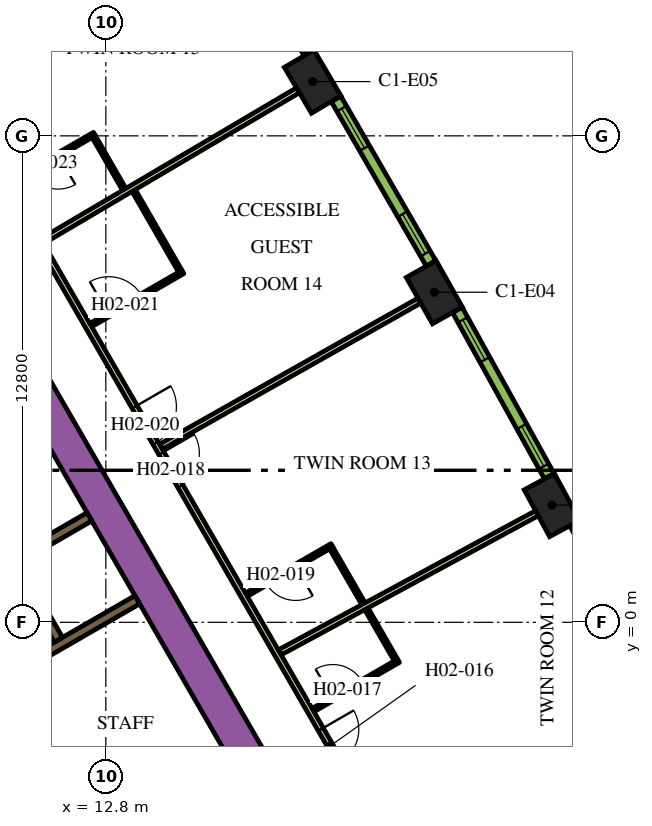
"""IFC4 building model, lengths in metres.
Left out: names, types, materials, properties, quantities, classifications, styles, units other than length and angle.
Written with IfcOpenShell. Run it as: python <this file> out.ifc"""

import sys

from ifc_helpers import new_model, si_unit, direction, frame, frame_2d, origin, origin_2d, place, context, subcontext, project, spatial, rectangle, extrude, element, fill, save


model = new_model("IFC4")
c1 = context("Model", 3, precision=1e-05, world=origin(), true_north=direction((0.0, 1.0)))
c2 = subcontext(c1, "Body", "Model", "MODEL_VIEW")
j1 = project(units=[si_unit("LENGTHUNIT", "METRE"), si_unit("PLANEANGLEUNIT", "RADIAN")], contexts=[c1])
p1 = place(None, origin())
s1 = spatial("IfcSite", under=j1, at=p1, CompositionType="ELEMENT")
p2 = place(p1, origin())
s2 = spatial("IfcBuilding", under=s1, at=p2, CompositionType="ELEMENT")
p3 = place(p2, frame((0.0, 0.0, 39.3)))
s3 = spatial("IfcBuildingStorey", under=s2, at=p3, CompositionType="ELEMENT", Elevation=39.3)
for number, where, z_axis, x_axis in (
    (1, (24.54, 3.085, 0.0), (0.0, 0.0, 1.0), (-0.476, 0.88, 0.0)),
    (2, (21.443, 8.685, 0.0), (0.0, 0.0, 1.0), (-0.492, 0.871, 0.0)),
    (3, (18.243, 14.228, 0.0), (0.0, 0.0, 1.0), (-0.508, 0.861, 0.0)),
):
    element("IfcColumn", number, at=place(p3, frame(where, z_axis=z_axis, x_axis=x_axis)), inside=s3, PredefinedType="COLUMN", context=c2, shape_type="SweptSolid", body=[
        extrude(rectangle(XDim=1.4, YDim=0.9, at=origin_2d()), origin(), (0.0, 0.0, 1.0), 3.9),
    ])
p4 = place(p3, frame((6.711, 13.476, 0.0), z_axis=(0.0, 0.0, 1.0), x_axis=(0.500002723396, -0.866023831425, 0.0)))
e4 = element("IfcWall", 4, at=p4, inside=s3, PredefinedType="SOLIDWALL", context=c2, shape_type="SweptSolid", body=[
    extrude(rectangle(XDim=20.334, YDim=0.9, at=frame_2d((10.167, 0.0))), origin(), (0.0, 0.0, 1.0), 3.9),
])
p5 = place(p3, frame((8.334, -2.964, 0.0), z_axis=(0.0, 0.0, 1.0), x_axis=(0.866016039709, -0.500016218704, 0.0)))
e5 = element("IfcWall", 5, at=p5, inside=s3, PredefinedType="SOLIDWALL", context=c2, shape_type="SweptSolid", body=[
    extrude(rectangle(XDim=7.05, YDim=0.25, at=frame_2d((3.525, 0.0))), origin(), (0.0, 0.0, 1.0), 3.9),
])
p6 = place(p3, frame((10.464, 1.677, 0.0), z_axis=(0.0, 0.0, 1.0), x_axis=(0.86605622881, 0.499946605688, 0.0)))
e6 = element("IfcWall", 6, at=p6, inside=s3, PredefinedType="SOLIDWALL", context=c2, shape_type="SweptSolid", body=[
    extrude(rectangle(XDim=2.2, YDim=0.25, at=frame_2d((1.1, 0.0))), origin(), (0.0, 0.0, 1.0), 3.9),
])
p7 = place(p3, frame((13.629, 0.594, 0.0), z_axis=(0.0, 0.0, 1.0), x_axis=(-0.86602790099, -0.499995674689, 0.0)))
e7 = element("IfcWall", 7, at=p7, inside=s3, PredefinedType="SOLIDWALL", context=c2, shape_type="SweptSolid", body=[
    extrude(rectangle(XDim=3.146, YDim=0.25, at=frame_2d((1.573, 0.0))), origin(), (0.0, 0.0, 1.0), 3.9),
])
p8 = place(p3, frame((11.553, -0.46, 0.0), z_axis=(0.0, 0.0, 1.0), x_axis=(-0.500006514828, 0.866021642414, 0.0)))
e8 = element("IfcWall", 8, at=p8, inside=s3, PredefinedType="SOLIDWALL", context=c2, shape_type="SweptSolid", body=[
    extrude(rectangle(XDim=12.35, YDim=0.25, at=frame_2d((6.175, 0.0))), origin(), (0.0, 0.0, 1.0), 3.9),
])
p9 = place(p8, frame((0.585, 0.0, 0.0)))
e9 = element("IfcOpeningElement", 9, at=p9, cuts=e8, PredefinedType="OPENING", context=c2, shape_type="SweptSolid", body=[
    extrude(rectangle(XDim=1.1, YDim=2.1, at=frame_2d((0.55, 1.05))), frame((0.0, 0.135, 0.0), z_axis=(0.0, -1.0, 0.0), x_axis=(1.0, 0.0, 0.0)), (0.0, 0.0, 1.0), 0.27),
])
p10 = place(p8, frame((3.105, 0.0, 0.0)))
e10 = element("IfcOpeningElement", 10, at=p10, cuts=e8, PredefinedType="OPENING", context=c2, shape_type="SweptSolid", body=[
    extrude(rectangle(XDim=1.1, YDim=2.1, at=frame_2d((0.55, 1.05))), frame((0.0, 0.135, 0.0), z_axis=(0.0, -1.0, 0.0), x_axis=(1.0, 0.0, 0.0)), (0.0, 0.0, 1.0), 0.27),
])
p11 = place(p8, frame((5.625, 0.0, 0.0)))
e11 = element("IfcOpeningElement", 11, at=p11, cuts=e8, PredefinedType="OPENING", context=c2, shape_type="SweptSolid", body=[
    extrude(rectangle(XDim=1.1, YDim=2.1, at=frame_2d((0.55, 1.05))), frame((0.0, 0.135, 0.0), z_axis=(0.0, -1.0, 0.0), x_axis=(1.0, 0.0, 0.0)), (0.0, 0.0, 1.0), 0.27),
])
p12 = place(p3, frame((6.163, 18.475, 0.0), z_axis=(0.0, 0.0, 1.0), x_axis=(0.500001317485, -0.866024643133, 0.0)))
e12 = element("IfcWall", 12, at=p12, inside=s3, PredefinedType="PARTITIONING", context=c2, shape_type="SweptSolid", body=[
    extrude(rectangle(XDim=25.767, YDim=0.15, at=frame_2d((12.883, 0.0))), origin(), (0.0, 0.0, 1.0), 2.75),
])
p13 = place(p12, frame((24.586, 0.0, 0.0)))
e13 = element("IfcOpeningElement", 13, at=p13, cuts=e12, PredefinedType="OPENING", context=c2, shape_type="SweptSolid", body=[
    extrude(rectangle(XDim=1.0, YDim=2.1, at=frame_2d((0.5, 1.05))), frame((0.0, 0.085, 0.0), z_axis=(0.0, -1.0, 0.0), x_axis=(1.0, 0.0, 0.0)), (0.0, 0.0, 1.0), 0.17),
])
p14 = place(p12, frame((16.196, 0.0, 0.0)))
e14 = element("IfcOpeningElement", 14, at=p14, cuts=e12, PredefinedType="OPENING", context=c2, shape_type="SweptSolid", body=[
    extrude(rectangle(XDim=1.0, YDim=2.1, at=frame_2d((0.5, 1.05))), frame((0.0, 0.085, 0.0), z_axis=(0.0, -1.0, 0.0), x_axis=(1.0, 0.0, 0.0)), (0.0, 0.0, 1.0), 0.17),
])
p15 = place(p12, frame((14.789, 0.0, 0.0)))
e15 = element("IfcOpeningElement", 15, at=p15, cuts=e12, PredefinedType="OPENING", context=c2, shape_type="SweptSolid", body=[
    extrude(rectangle(XDim=1.1, YDim=2.1, at=frame_2d((0.55, 1.05))), frame((0.0, 0.085, 0.0), z_axis=(0.0, -1.0, 0.0), x_axis=(1.0, 0.0, 0.0)), (0.0, 0.0, 1.0), 0.17),
])
p16 = place(p12, frame((3.698, 0.0, 0.0)))
e16 = element("IfcOpeningElement", 16, at=p16, cuts=e12, PredefinedType="OPENING", context=c2, shape_type="SweptSolid", body=[
    extrude(rectangle(XDim=1.0, YDim=2.1, at=frame_2d((0.5, 1.05))), frame((0.0, 0.085, 0.0), z_axis=(0.0, -1.0, 0.0), x_axis=(1.0, 0.0, 0.0)), (0.0, 0.0, 1.0), 0.17),
])
p17 = place(p12, frame((2.391, 0.0, 0.0)))
e17 = element("IfcOpeningElement", 17, at=p17, cuts=e12, PredefinedType="OPENING", context=c2, shape_type="SweptSolid", body=[
    extrude(rectangle(XDim=1.0, YDim=2.1, at=frame_2d((0.5, 1.05))), frame((0.0, 0.085, 0.0), z_axis=(0.0, -1.0, 0.0), x_axis=(1.0, 0.0, 0.0)), (0.0, 0.0, 1.0), 0.17),
])
p18 = place(p3, frame((17.856, 13.999, 0.0), z_axis=(0.0, 0.0, 1.0), x_axis=(-0.861371519381, -0.507975497047, 0.0)))
e18 = element("IfcWall", 18, at=p18, inside=s3, PredefinedType="PARTITIONING", context=c2, shape_type="SweptSolid", body=[
    extrude(rectangle(XDim=7.804, YDim=0.15, at=frame_2d((3.902, 0.0))), origin(), (0.0, 0.0, 1.0), 2.75),
])
p19 = place(p3, frame((21.052, 8.464, 0.0), z_axis=(0.0, 0.0, 1.0), x_axis=(-0.87059371954, -0.492002617368, 0.0)))
e19 = element("IfcWall", 19, at=p19, inside=s3, PredefinedType="PARTITIONING", context=c2, shape_type="SweptSolid", body=[
    extrude(rectangle(XDim=7.803, YDim=0.15, at=frame_2d((3.902, 0.0))), origin(), (0.0, 0.0, 1.0), 2.75),
])
p20 = place(p3, frame((27.134, -2.779, 0.0), z_axis=(0.0, 0.0, 1.0), x_axis=(-0.8882049501, -0.459447457951, 0.0)))
e20 = element("IfcWall", 20, at=p20, inside=s3, PredefinedType="PARTITIONING", context=c2, shape_type="SweptSolid", body=[
    extrude(rectangle(XDim=11.638, YDim=0.15, at=frame_2d((5.819, 0.0))), origin(), (0.0, 0.0, 1.0), 2.75),
])
p21 = place(p3, frame((24.145, 2.871, 0.0), z_axis=(0.0, 0.0, 1.0), x_axis=(-0.879551725039, -0.475803281809, 0.0)))
e21 = element("IfcWall", 21, at=p21, inside=s3, PredefinedType="PARTITIONING", context=c2, shape_type="SweptSolid", body=[
    extrude(rectangle(XDim=7.688, YDim=0.15, at=frame_2d((3.844, 0.0))), origin(), (0.0, 0.0, 1.0), 2.75),
])
p22 = place(p3, frame((18.25, -2.311, 0.0), z_axis=(0.0, 0.0, 1.0), x_axis=(0.866021400173, 0.500006934395, 0.0)))
e22 = element("IfcWall", 22, at=p22, inside=s3, PredefinedType="PARTITIONING", context=c2, shape_type="SweptSolid", body=[
    extrude(rectangle(XDim=2.6, YDim=0.1, at=frame_2d((1.3, 0.0))), origin(), (0.0, 0.0, 1.0), 2.75),
])
p23 = place(p22, frame((0.6, 0.0, 0.0)))
e23 = element("IfcOpeningElement", 23, at=p23, cuts=e22, PredefinedType="OPENING", context=c2, shape_type="SweptSolid", body=[
    extrude(rectangle(XDim=0.9, YDim=2.1, at=frame_2d((0.45, 1.05))), frame((0.0, 0.06, 0.0), z_axis=(0.0, -1.0, 0.0), x_axis=(1.0, 0.0, 0.0)), (0.0, 0.0, 1.0), 0.12),
])
p24 = place(p3, frame((20.434, -0.993, 0.0), z_axis=(0.0, 0.0, 1.0), x_axis=(-0.500086022567, 0.865975732936, 0.0)))
e24 = element("IfcWall", 24, at=p24, inside=s3, PredefinedType="PARTITIONING", context=c2, shape_type="SweptSolid", body=[
    extrude(rectangle(XDim=1.55, YDim=0.1, at=frame_2d((0.775, 0.0))), origin(), (0.0, 0.0, 1.0), 2.75),
])
p25 = place(p3, frame((18.749, 2.026, 0.0), z_axis=(0.0, 0.0, 1.0), x_axis=(-0.866021400173, -0.500006934395, 0.0)))
e25 = element("IfcWall", 25, at=p25, inside=s3, PredefinedType="PARTITIONING", context=c2, shape_type="SweptSolid", body=[
    extrude(rectangle(XDim=2.6, YDim=0.1, at=frame_2d((1.3, 0.0))), origin(), (0.0, 0.0, 1.0), 2.75),
])
p26 = place(p25, frame((1.1, 0.0, 0.0)))
e26 = element("IfcOpeningElement", 26, at=p26, cuts=e25, PredefinedType="OPENING", context=c2, shape_type="SweptSolid", body=[
    extrude(rectangle(XDim=0.9, YDim=2.1, at=frame_2d((0.45, 1.05))), frame((0.0, 0.06, 0.0), z_axis=(0.0, -1.0, 0.0), x_axis=(1.0, 0.0, 0.0)), (0.0, 0.0, 1.0), 0.12),
])
p27 = place(p3, frame((18.731, 1.958, 0.0), z_axis=(0.0, 0.0, 1.0), x_axis=(0.499976720371, -0.866038843867, 0.0)))
e27 = element("IfcWall", 27, at=p27, inside=s3, PredefinedType="PARTITIONING", context=c2, shape_type="SweptSolid", body=[
    extrude(rectangle(XDim=1.69, YDim=0.1, at=frame_2d((0.845, 0.0))), origin(), (0.0, 0.0, 1.0), 2.75),
])
p28 = place(p3, frame((12.402, 7.819, 0.0), z_axis=(0.0, 0.0, 1.0), x_axis=(0.866034573852, 0.49998411664, 0.0)))
e28 = element("IfcWall", 28, at=p28, inside=s3, PredefinedType="PARTITIONING", context=c2, shape_type="SweptSolid", body=[
    extrude(rectangle(XDim=2.8, YDim=0.1, at=frame_2d((1.4, 0.0))), origin(), (0.0, 0.0, 1.0), 2.75),
])
p29 = place(p28, frame((0.55, 0.0, 0.0)))
e29 = element("IfcOpeningElement", 29, at=p29, cuts=e28, PredefinedType="OPENING", context=c2, shape_type="SweptSolid", body=[
    extrude(rectangle(XDim=1.0, YDim=2.1, at=frame_2d((0.5, 1.05))), frame((0.0, 0.06, 0.0), z_axis=(0.0, -1.0, 0.0), x_axis=(1.0, 0.0, 0.0)), (0.0, 0.0, 1.0), 0.12),
])
p30 = place(p3, frame((14.759, 9.237, 0.0), z_axis=(0.0, 0.0, 1.0), x_axis=(-0.499943856944, 0.866057815567, 0.0)))
e30 = element("IfcWall", 30, at=p30, inside=s3, PredefinedType="PARTITIONING", context=c2, shape_type="SweptSolid", body=[
    extrude(rectangle(XDim=2.45, YDim=0.1, at=frame_2d((1.225, 0.0))), origin(), (0.0, 0.0, 1.0), 2.75),
])
p31 = place(p3, frame((12.5, 12.849, 0.0), z_axis=(0.0, 0.0, 1.0), x_axis=(-0.866021400173, -0.500006934395, 0.0)))
e31 = element("IfcWall", 31, at=p31, inside=s3, PredefinedType="PARTITIONING", context=c2, shape_type="SweptSolid", body=[
    extrude(rectangle(XDim=2.6, YDim=0.1, at=frame_2d((1.3, 0.0))), origin(), (0.0, 0.0, 1.0), 2.75),
])
p32 = place(p31, frame((1.1, 0.0, 0.0)))
e32 = element("IfcOpeningElement", 32, at=p32, cuts=e31, PredefinedType="OPENING", context=c2, shape_type="SweptSolid", body=[
    extrude(rectangle(XDim=0.9, YDim=2.1, at=frame_2d((0.45, 1.05))), frame((0.0, 0.06, 0.0), z_axis=(0.0, -1.0, 0.0), x_axis=(1.0, 0.0, 0.0)), (0.0, 0.0, 1.0), 0.12),
])
p33 = place(p3, frame((12.482, 12.781, 0.0), z_axis=(0.0, 0.0, 1.0), x_axis=(0.500061482766, -0.865989903783, 0.0)))
e33 = element("IfcWall", 33, at=p33, inside=s3, PredefinedType="PARTITIONING", context=c2, shape_type="SweptSolid", body=[
    extrude(rectangle(XDim=1.6, YDim=0.1, at=frame_2d((0.8, 0.0))), origin(), (0.0, 0.0, 1.0), 2.75),
])
p34 = place(p3, frame((27.475, -1.81, 0.0), z_axis=(0.0, 0.0, 1.0), x_axis=(-0.467629620899, 0.883924509026, 0.0)))
e34 = element("IfcWall", 34, at=p34, inside=s3, PredefinedType="SOLIDWALL", context=c2, shape_type="SweptSolid", body=[
    extrude(rectangle(XDim=4.998, YDim=0.29, at=frame_2d((2.499, 0.0))), origin(), (0.0, 0.0, 1.0), 3.65),
])
p35 = place(p34, frame((0.297, 0.0, 0.9)))
e35 = element("IfcOpeningElement", 35, at=p35, cuts=e34, PredefinedType="OPENING", context=c2, shape_type="SweptSolid", body=[
    extrude(rectangle(XDim=1.2, YDim=2.15, at=frame_2d((0.6, 1.075))), frame((0.0, 0.155, 0.0), z_axis=(0.0, -1.0, 0.0), x_axis=(1.0, 0.0, 0.0)), (0.0, 0.0, 1.0), 0.31),
])
p36 = place(p34, frame((3.501, 0.0, 0.9)))
e36 = element("IfcOpeningElement", 36, at=p36, cuts=e34, PredefinedType="OPENING", context=c2, shape_type="SweptSolid", body=[
    extrude(rectangle(XDim=1.2, YDim=2.15, at=frame_2d((0.6, 1.075))), frame((0.0, 0.155, 0.0), z_axis=(0.0, -1.0, 0.0), x_axis=(1.0, 0.0, 0.0)), (0.0, 0.0, 1.0), 0.31),
])
p37 = place(p3, frame((24.468, 3.846, 0.0), z_axis=(0.0, 0.0, 1.0), x_axis=(-0.483912572871, 0.875116347589, 0.0)))
e37 = element("IfcWall", 37, at=p37, inside=s3, PredefinedType="SOLIDWALL", context=c2, shape_type="SweptSolid", body=[
    extrude(rectangle(XDim=4.998, YDim=0.29, at=frame_2d((2.499, 0.0))), origin(), (0.0, 0.0, 1.0), 3.65),
])
p38 = place(p37, frame((0.297, 0.0, 0.9)))
e38 = element("IfcOpeningElement", 38, at=p38, cuts=e37, PredefinedType="OPENING", context=c2, shape_type="SweptSolid", body=[
    extrude(rectangle(XDim=1.2, YDim=2.15, at=frame_2d((0.6, 1.075))), frame((0.0, 0.155, 0.0), z_axis=(0.0, -1.0, 0.0), x_axis=(1.0, 0.0, 0.0)), (0.0, 0.0, 1.0), 0.31),
])
p39 = place(p37, frame((3.501, 0.0, 0.9)))
e39 = element("IfcOpeningElement", 39, at=p39, cuts=e37, PredefinedType="OPENING", context=c2, shape_type="SweptSolid", body=[
    extrude(rectangle(XDim=1.2, YDim=2.15, at=frame_2d((0.6, 1.075))), frame((0.0, 0.155, 0.0), z_axis=(0.0, -1.0, 0.0), x_axis=(1.0, 0.0, 0.0)), (0.0, 0.0, 1.0), 0.31),
])
p40 = place(p3, frame((21.357, 9.445, 0.0), z_axis=(0.0, 0.0, 1.0), x_axis=(-0.50002123722, 0.866013142123, 0.0)))
e40 = element("IfcWall", 40, at=p40, inside=s3, PredefinedType="SOLIDWALL", context=c2, shape_type="SweptSolid", body=[
    extrude(rectangle(XDim=4.998, YDim=0.29, at=frame_2d((2.499, 0.0))), origin(), (0.0, 0.0, 1.0), 3.65),
])
p41 = place(p40, frame((0.297, 0.0, 0.9)))
e41 = element("IfcOpeningElement", 41, at=p41, cuts=e40, PredefinedType="OPENING", context=c2, shape_type="SweptSolid", body=[
    extrude(rectangle(XDim=1.2, YDim=2.15, at=frame_2d((0.6, 1.075))), frame((0.0, 0.155, 0.0), z_axis=(0.0, -1.0, 0.0), x_axis=(1.0, 0.0, 0.0)), (0.0, 0.0, 1.0), 0.31),
])
p42 = place(p40, frame((3.501, 0.0, 0.9)))
e42 = element("IfcOpeningElement", 42, at=p42, cuts=e40, PredefinedType="OPENING", context=c2, shape_type="SweptSolid", body=[
    extrude(rectangle(XDim=1.2, YDim=2.15, at=frame_2d((0.6, 1.075))), frame((0.0, 0.155, 0.0), z_axis=(0.0, -1.0, 0.0), x_axis=(1.0, 0.0, 0.0)), (0.0, 0.0, 1.0), 0.31),
])
p43 = place(p3, frame((18.143, 14.986, 0.0), z_axis=(0.0, 0.0, 1.0), x_axis=(-0.515938796285, 0.856625448191, 0.0)))
e43 = element("IfcWall", 43, at=p43, inside=s3, PredefinedType="SOLIDWALL", context=c2, shape_type="SweptSolid", body=[
    extrude(rectangle(XDim=4.998, YDim=0.29, at=frame_2d((2.499, 0.0))), origin(), (0.0, 0.0, 1.0), 3.65),
])
p44 = place(p43, frame((0.297, 0.0, 0.9)))
e44 = element("IfcOpeningElement", 44, at=p44, cuts=e43, PredefinedType="OPENING", context=c2, shape_type="SweptSolid", body=[
    extrude(rectangle(XDim=1.2, YDim=2.15, at=frame_2d((0.6, 1.075))), frame((0.0, 0.155, 0.0), z_axis=(0.0, -1.0, 0.0), x_axis=(1.0, 0.0, 0.0)), (0.0, 0.0, 1.0), 0.31),
])
p45 = place(p43, frame((3.501, 0.0, 0.9)))
e45 = element("IfcOpeningElement", 45, at=p45, cuts=e43, PredefinedType="OPENING", context=c2, shape_type="SweptSolid", body=[
    extrude(rectangle(XDim=1.2, YDim=2.15, at=frame_2d((0.6, 1.075))), frame((0.0, 0.155, 0.0), z_axis=(0.0, -1.0, 0.0), x_axis=(1.0, 0.0, 0.0)), (0.0, 0.0, 1.0), 0.31),
])
p46 = place(p13, origin())
e46 = element("IfcDoor", 46, at=p46, inside=s3, OperationType="SINGLE_SWING_RIGHT", PredefinedType="DOOR", context=c2, shape_type="SweptSolid", body=[
    extrude(rectangle(XDim=1.0, YDim=2.1, at=frame_2d((0.5, 1.05))), frame((0.0, 0.025, 0.0), z_axis=(0.0, -1.0, 0.0), x_axis=(1.0, 0.0, 0.0)), (0.0, 0.0, 1.0), 0.05),
])
fill(e13, e46)
p47 = place(p23, origin())
e47 = element("IfcDoor", 47, at=p47, inside=s3, OperationType="SINGLE_SWING_RIGHT", PredefinedType="DOOR", context=c2, shape_type="SweptSolid", body=[
    extrude(rectangle(XDim=0.9, YDim=2.1, at=frame_2d((0.45, 1.05))), frame((0.0, 0.025, 0.0), z_axis=(0.0, -1.0, 0.0), x_axis=(1.0, 0.0, 0.0)), (0.0, 0.0, 1.0), 0.05),
])
fill(e23, e47)
p48 = place(p14, origin())
e48 = element("IfcDoor", 48, at=p48, inside=s3, OperationType="SINGLE_SWING_LEFT", PredefinedType="DOOR", context=c2, shape_type="SweptSolid", body=[
    extrude(rectangle(XDim=1.0, YDim=2.1, at=frame_2d((0.5, 1.05))), frame((0.0, 0.025, 0.0), z_axis=(0.0, -1.0, 0.0), x_axis=(1.0, 0.0, 0.0)), (0.0, 0.0, 1.0), 0.05),
])
fill(e14, e48)
p49 = place(p26, origin())
e49 = element("IfcDoor", 49, at=p49, inside=s3, OperationType="SINGLE_SWING_LEFT", PredefinedType="DOOR", context=c2, shape_type="SweptSolid", body=[
    extrude(rectangle(XDim=0.9, YDim=2.1, at=frame_2d((0.45, 1.05))), frame((0.0, 0.025, 0.0), z_axis=(0.0, -1.0, 0.0), x_axis=(1.0, 0.0, 0.0)), (0.0, 0.0, 1.0), 0.05),
])
fill(e26, e49)
p50 = place(p15, origin())
e50 = element("IfcDoor", 50, at=p50, inside=s3, OperationType="SINGLE_SWING_RIGHT", PredefinedType="DOOR", context=c2, shape_type="SweptSolid", body=[
    extrude(rectangle(XDim=1.1, YDim=2.1, at=frame_2d((0.55, 1.05))), frame((0.0, 0.025, 0.0), z_axis=(0.0, -1.0, 0.0), x_axis=(1.0, 0.0, 0.0)), (0.0, 0.0, 1.0), 0.05),
])
fill(e15, e50)
p51 = place(p29, origin())
e51 = element("IfcDoor", 51, at=p51, inside=s3, OperationType="SINGLE_SWING_LEFT", PredefinedType="DOOR", context=c2, shape_type="SweptSolid", body=[
    extrude(rectangle(XDim=1.0, YDim=2.1, at=frame_2d((0.5, 1.05))), frame((0.0, 0.025, 0.0), z_axis=(0.0, -1.0, 0.0), x_axis=(1.0, 0.0, 0.0)), (0.0, 0.0, 1.0), 0.05),
])
fill(e29, e51)
p52 = place(p32, origin())
e52 = element("IfcDoor", 52, at=p52, inside=s3, OperationType="SINGLE_SWING_RIGHT", PredefinedType="DOOR", context=c2, shape_type="SweptSolid", body=[
    extrude(rectangle(XDim=0.9, YDim=2.1, at=frame_2d((0.45, 1.05))), frame((0.0, 0.025, 0.0), z_axis=(0.0, -1.0, 0.0), x_axis=(1.0, 0.0, 0.0)), (0.0, 0.0, 1.0), 0.05),
])
fill(e32, e52)
p53 = place(p38, origin())
e53 = element("IfcWindow", 53, at=p53, inside=s3, PartitioningType="DOUBLE_PANEL_VERTICAL", PredefinedType="WINDOW", context=c2, shape_type="SweptSolid", body=[
    extrude(rectangle(XDim=1.2, YDim=2.15, at=frame_2d((0.6, 1.075))), frame((0.0, 0.015, 0.0), z_axis=(0.0, -1.0, 0.0), x_axis=(1.0, 0.0, 0.0)), (0.0, 0.0, 1.0), 0.06),
])
fill(e38, e53)
p54 = place(p39, origin())
e54 = element("IfcWindow", 54, at=p54, inside=s3, PartitioningType="DOUBLE_PANEL_VERTICAL", PredefinedType="WINDOW", context=c2, shape_type="SweptSolid", body=[
    extrude(rectangle(XDim=1.2, YDim=2.15, at=frame_2d((0.6, 1.075))), frame((0.0, 0.015, 0.0), z_axis=(0.0, -1.0, 0.0), x_axis=(1.0, 0.0, 0.0)), (0.0, 0.0, 1.0), 0.06),
])
fill(e39, e54)
p55 = place(p41, origin())
e55 = element("IfcWindow", 55, at=p55, inside=s3, PartitioningType="DOUBLE_PANEL_VERTICAL", PredefinedType="WINDOW", context=c2, shape_type="SweptSolid", body=[
    extrude(rectangle(XDim=1.2, YDim=2.15, at=frame_2d((0.6, 1.075))), frame((0.0, 0.015, 0.0), z_axis=(0.0, -1.0, 0.0), x_axis=(1.0, 0.0, 0.0)), (0.0, 0.0, 1.0), 0.06),
])
fill(e41, e55)
p56 = place(p42, origin())
e56 = element("IfcWindow", 56, at=p56, inside=s3, PartitioningType="DOUBLE_PANEL_VERTICAL", PredefinedType="WINDOW", context=c2, shape_type="SweptSolid", body=[
    extrude(rectangle(XDim=1.2, YDim=2.15, at=frame_2d((0.6, 1.075))), frame((0.0, 0.015, 0.0), z_axis=(0.0, -1.0, 0.0), x_axis=(1.0, 0.0, 0.0)), (0.0, 0.0, 1.0), 0.06),
])
fill(e42, e56)
save(model, sys.argv[1])
